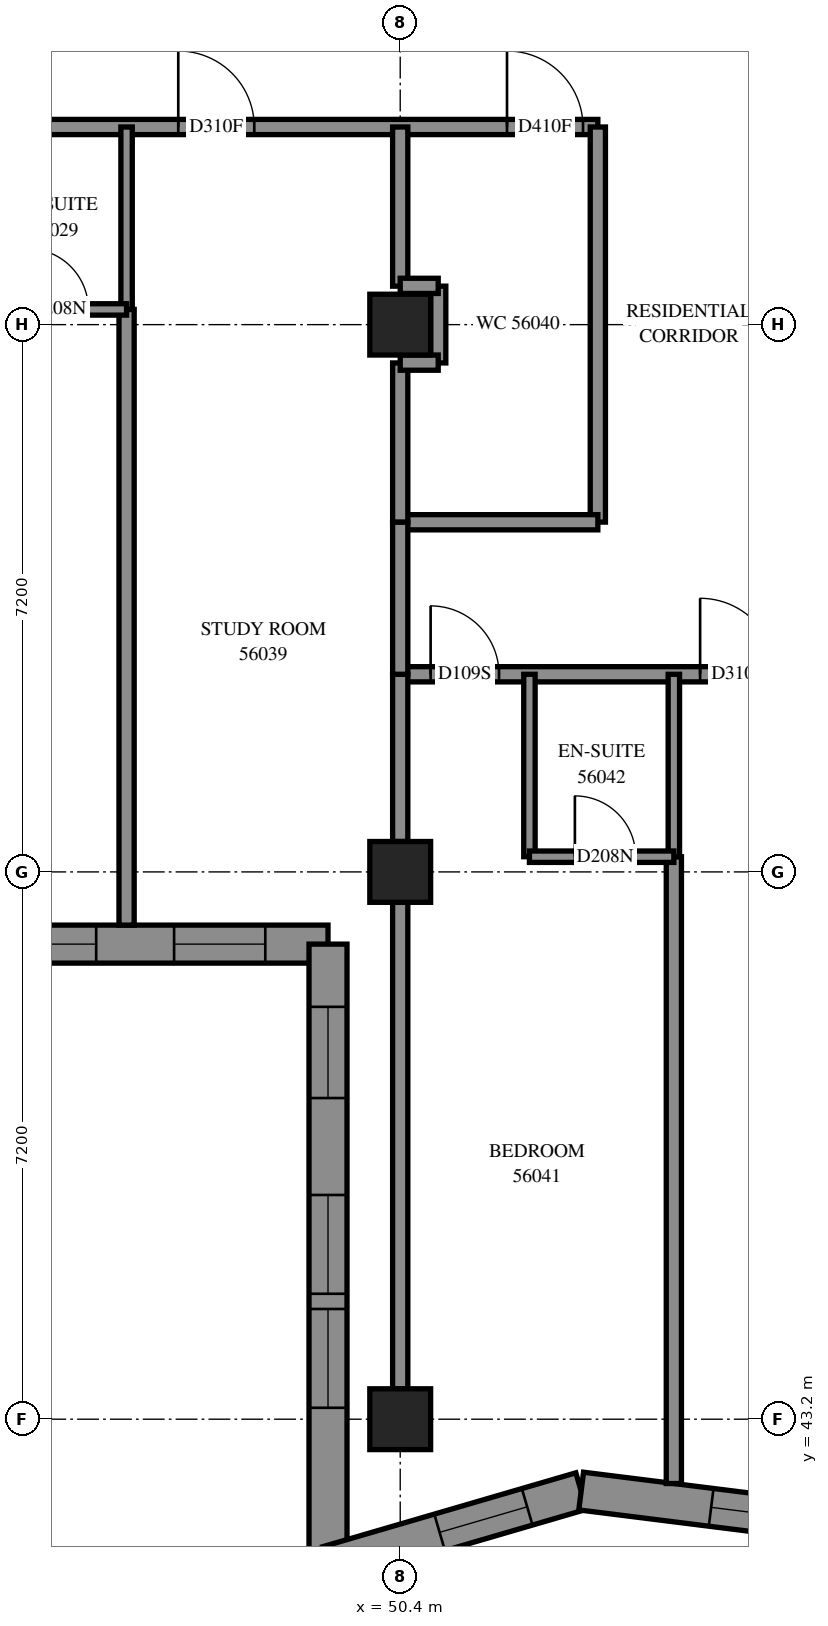
"""IFC4 building model, lengths in metres.
Left out: names, types, materials, properties, quantities, classifications, styles, units other than length and angle.
Written with IfcOpenShell. Run it as: python <this file> out.ifc"""

import sys

from ifc_helpers import new_model, si_unit, direction, frame, frame_2d, origin, origin_2d, place, context, subcontext, project, spatial, polyline, rectangle, outline, extrude, element, fill, save


model = new_model("IFC4")
c1 = context("Model", 3, precision=1e-05, world=origin(), true_north=direction((0.0, 1.0)))
c2 = subcontext(c1, "Body", "Model", "MODEL_VIEW")
j1 = project(units=[si_unit("LENGTHUNIT", "METRE"), si_unit("PLANEANGLEUNIT", "RADIAN")], contexts=[c1])
p1 = place(None, origin())
s1 = spatial("IfcSite", under=j1, at=p1, CompositionType="ELEMENT")
p2 = place(p1, origin())
s2 = spatial("IfcBuilding", under=s1, at=p2, CompositionType="ELEMENT")
p3 = place(p2, frame((0.0, 0.0, 206.6)))
s3 = spatial("IfcBuildingStorey", under=s2, at=p3, CompositionType="ELEMENT", Elevation=206.6)
for number, where, z_axis, x_axis in (
    (1, (50.4, 43.2, 0.0), (0.0, 0.0, 1.0), (1.0, 0.0, 0.0)),
    (2, (50.4, 50.4, 0.0), (0.0, 0.0, 1.0), (1.0, 0.0, 0.0)),
    (3, (50.4, 57.6, 0.0), (0.0, 0.0, 1.0), (1.0, 0.0, 0.0)),
):
    element("IfcColumn", number, at=place(p3, frame(where, z_axis=z_axis, x_axis=x_axis)), inside=s3, PredefinedType="COLUMN", context=c2, shape_type="SweptSolid", body=[
        extrude(rectangle(XDim=0.8, YDim=0.8, at=origin_2d()), origin(), (0.0, 0.0, 1.0), 3.1),
    ])
p4 = place(p3, frame((42.25, 49.45, 0.0), z_axis=(0.0, 0.0, 1.0), x_axis=(1.0, 0.0, 0.0)))
e4 = element("IfcWall", 4, at=p4, inside=s3, PredefinedType="SOLIDWALL", context=c2, shape_type="SweptSolid", body=[
    extrude(outline(polyline([(-0.25, -0.25), (6.95, -0.25), (7.45, 0.25), (0.25, 0.25), (-0.25, -0.25)])), origin(), (0.0, 0.0, 1.0), 3.1),
])
p5 = place(p4, frame((1.35, 0.0, 0.45)))
e5 = element("IfcOpeningElement", 5, at=p5, cuts=e4, PredefinedType="OPENING", context=c2, shape_type="SweptSolid", body=[
    extrude(rectangle(XDim=1.3, YDim=2.5, at=frame_2d((0.65, 1.25))), frame((0.0, 0.26, 0.0), z_axis=(0.0, -1.0, 0.0), x_axis=(1.0, 0.0, 0.0)), (0.0, 0.0, 1.0), 0.52),
])
p6 = place(p4, frame((2.85, 0.0, 0.45)))
e6 = element("IfcOpeningElement", 6, at=p6, cuts=e4, PredefinedType="OPENING", context=c2, shape_type="SweptSolid", body=[
    extrude(rectangle(XDim=1.3, YDim=2.5, at=frame_2d((0.65, 1.25))), frame((0.0, 0.26, 0.0), z_axis=(0.0, -1.0, 0.0), x_axis=(1.0, 0.0, 0.0)), (0.0, 0.0, 1.0), 0.52),
])
p7 = place(p4, frame((5.175, 0.0, 0.45)))
e7 = element("IfcOpeningElement", 7, at=p7, cuts=e4, PredefinedType="OPENING", context=c2, shape_type="SweptSolid", body=[
    extrude(rectangle(XDim=1.2, YDim=2.5, at=frame_2d((0.6, 1.25))), frame((0.0, 0.26, 0.0), z_axis=(0.0, -1.0, 0.0), x_axis=(1.0, 0.0, 0.0)), (0.0, 0.0, 1.0), 0.52),
])
p8 = place(p3, frame((49.45, 49.45, 0.0), z_axis=(0.0, 0.0, 1.0), x_axis=(0.0, -1.0, 0.0)))
e8 = element("IfcWall", 8, at=p8, inside=s3, PredefinedType="SOLIDWALL", context=c2, shape_type="SweptSolid", body=[
    extrude(outline(polyline([(0.25, -0.25), (8.501, -0.25), (7.834, 0.25), (-0.25, 0.25), (0.25, -0.25)])), origin(), (0.0, 0.0, 1.0), 3.1),
])
p9 = place(p8, frame((3.3, 0.0, 0.45)))
e9 = element("IfcOpeningElement", 9, at=p9, cuts=e8, PredefinedType="OPENING", context=c2, shape_type="SweptSolid", body=[
    extrude(rectangle(XDim=1.3, YDim=2.5, at=frame_2d((0.65, 1.25))), frame((0.0, 0.26, 0.0), z_axis=(0.0, -1.0, 0.0), x_axis=(1.0, 0.0, 0.0)), (0.0, 0.0, 1.0), 0.52),
])
p10 = place(p8, frame((4.8, 0.0, 0.45)))
e10 = element("IfcOpeningElement", 10, at=p10, cuts=e8, PredefinedType="OPENING", context=c2, shape_type="SweptSolid", body=[
    extrude(rectangle(XDim=1.3, YDim=2.5, at=frame_2d((0.65, 1.25))), frame((0.0, 0.26, 0.0), z_axis=(0.0, -1.0, 0.0), x_axis=(1.0, 0.0, 0.0)), (0.0, 0.0, 1.0), 0.52),
])
p11 = place(p8, frame((0.825, 0.0, 0.45)))
e11 = element("IfcOpeningElement", 11, at=p11, cuts=e8, PredefinedType="OPENING", context=c2, shape_type="SweptSolid", body=[
    extrude(rectangle(XDim=1.2, YDim=2.5, at=frame_2d((0.6, 1.25))), frame((0.0, 0.26, 0.0), z_axis=(0.0, -1.0, 0.0), x_axis=(1.0, 0.0, 0.0)), (0.0, 0.0, 1.0), 0.52),
])
p12 = place(p3, frame((49.45, 41.282, 0.0), z_axis=(0.0, 0.0, 1.0), x_axis=(0.9599454259, 0.2801870435, 0.0)))
e12 = element("IfcWall", 12, at=p12, inside=s3, PredefinedType="SOLIDWALL", context=c2, shape_type="SweptSolid", body=[
    extrude(outline(polyline([(-0.333, -0.25), (3.418, -0.25), (3.521, 0.25), (0.333, 0.25), (-0.333, -0.25)])), origin(), (0.0, 0.0, 1.0), 3.1),
])
p13 = place(p12, frame((1.53, 0.0, 0.45)))
e13 = element("IfcOpeningElement", 13, at=p13, cuts=e12, PredefinedType="OPENING", context=c2, shape_type="SweptSolid", body=[
    extrude(rectangle(XDim=1.2, YDim=2.5, at=frame_2d((0.6, 1.25))), frame((0.0, 0.26, 0.0), z_axis=(0.0, -1.0, 0.0), x_axis=(1.0, 0.0, 0.0)), (0.0, 0.0, 1.0), 0.52),
])
p14 = place(p3, frame((52.781, 42.255, 0.0), z_axis=(0.0, 0.0, 1.0), x_axis=(0.9922491844, -0.1242640575, 0.0)))
e14 = element("IfcWall", 14, at=p14, inside=s3, PredefinedType="SOLIDWALL", context=c2, shape_type="SweptSolid", body=[
    extrude(outline(polyline([(0.052, -0.25), (3.681, -0.25), (3.618, 0.25), (-0.052, 0.25), (0.052, -0.25)])), origin(), (0.0, 0.0, 1.0), 3.1),
])
p15 = place(p14, frame((1.724, 0.0, 0.45)))
e15 = element("IfcOpeningElement", 15, at=p15, cuts=e14, PredefinedType="OPENING", context=c2, shape_type="SweptSolid", body=[
    extrude(rectangle(XDim=1.2, YDim=2.5, at=frame_2d((0.6, 1.25))), frame((0.0, 0.26, 0.0), z_axis=(0.0, -1.0, 0.0), x_axis=(1.0, 0.0, 0.0)), (0.0, 0.0, 1.0), 0.52),
])
p16 = place(p3, frame((36.0, 60.2, 0.0), z_axis=(0.0, 0.0, 1.0), x_axis=(1.0, 0.0, 0.0)))
e16 = element("IfcWall", 16, at=p16, inside=s3, PredefinedType="PARTITIONING", context=c2, shape_type="SweptSolid", body=[
    extrude(rectangle(XDim=17.0, YDim=0.2, at=frame_2d((8.5, 0.0))), origin(), (0.0, 0.0, 1.0), 3.1),
])
p17 = place(p16, frame((4.125, 0.0, 0.0)))
e17 = element("IfcOpeningElement", 17, at=p17, cuts=e16, PredefinedType="OPENING", context=c2, shape_type="SweptSolid", body=[
    extrude(rectangle(XDim=1.0, YDim=2.1, at=frame_2d((0.5, 1.05))), frame((0.0, 0.11, 0.0), z_axis=(0.0, -1.0, 0.0), x_axis=(1.0, 0.0, 0.0)), (0.0, 0.0, 1.0), 0.22),
])
p18 = place(p16, frame((7.6, 0.0, 0.0)))
e18 = element("IfcOpeningElement", 18, at=p18, cuts=e16, PredefinedType="OPENING", context=c2, shape_type="SweptSolid", body=[
    extrude(rectangle(XDim=0.9, YDim=2.1, at=frame_2d((0.45, 1.05))), frame((0.0, 0.11, 0.0), z_axis=(0.0, -1.0, 0.0), x_axis=(1.0, 0.0, 0.0)), (0.0, 0.0, 1.0), 0.22),
])
p19 = place(p16, frame((11.48, 0.0, 0.0)))
e19 = element("IfcOpeningElement", 19, at=p19, cuts=e16, PredefinedType="OPENING", context=c2, shape_type="SweptSolid", body=[
    extrude(rectangle(XDim=1.0, YDim=2.1, at=frame_2d((0.5, 1.05))), frame((0.0, 0.11, 0.0), z_axis=(0.0, -1.0, 0.0), x_axis=(1.0, 0.0, 0.0)), (0.0, 0.0, 1.0), 0.22),
])
p20 = place(p16, frame((15.805, 0.0, 0.0)))
e20 = element("IfcOpeningElement", 20, at=p20, cuts=e16, PredefinedType="OPENING", context=c2, shape_type="SweptSolid", body=[
    extrude(rectangle(XDim=1.0, YDim=2.1, at=frame_2d((0.5, 1.05))), frame((0.0, 0.11, 0.0), z_axis=(0.0, -1.0, 0.0), x_axis=(1.0, 0.0, 0.0)), (0.0, 0.0, 1.0), 0.22),
])
p21 = place(p3, frame((54.0, 42.354, 0.0), z_axis=(0.0, 0.0, 1.0), x_axis=(0.0, 1.0, 0.0)))
e21 = element("IfcWall", 21, at=p21, inside=s3, PredefinedType="PARTITIONING", context=c2, shape_type="SweptSolid", body=[
    extrude(rectangle(XDim=8.246, YDim=0.2, at=frame_2d((4.123, 0.0))), origin(), (0.0, 0.0, 1.0), 3.1),
])
p22 = place(p3, frame((46.8, 49.7, 0.0), z_axis=(0.0, 0.0, 1.0), x_axis=(0.0, 1.0, 0.0)))
e22 = element("IfcWall", 22, at=p22, inside=s3, PredefinedType="PARTITIONING", context=c2, shape_type="SweptSolid", body=[
    extrude(rectangle(XDim=8.1, YDim=0.2, at=frame_2d((4.05, 0.0))), origin(), (0.0, 0.0, 1.0), 3.1),
])
p23 = place(p3, frame((50.4, 43.6, 0.0), z_axis=(0.0, 0.0, 1.0), x_axis=(0.0, 1.0, 0.0)))
e23 = element("IfcWall", 23, at=p23, inside=s3, PredefinedType="PARTITIONING", context=c2, shape_type="SweptSolid", body=[
    extrude(rectangle(XDim=6.4, YDim=0.2, at=frame_2d((3.2, 0.0))), origin(), (0.0, 0.0, 1.0), 2.6),
])
p24 = place(p3, frame((50.4, 53.0, 0.0), z_axis=(0.0, 0.0, 1.0), x_axis=(1.0, 0.0, 0.0)))
e24 = element("IfcWall", 24, at=p24, inside=s3, PredefinedType="PARTITIONING", context=c2, shape_type="SweptSolid", body=[
    extrude(rectangle(XDim=5.2, YDim=0.2, at=frame_2d((2.6, 0.0))), origin(), (0.0, 0.0, 1.0), 3.1),
])
p25 = place(p24, frame((0.4, 0.0, 0.0)))
e25 = element("IfcOpeningElement", 25, at=p25, cuts=e24, PredefinedType="OPENING", context=c2, shape_type="SweptSolid", body=[
    extrude(rectangle(XDim=0.9, YDim=2.1, at=frame_2d((0.45, 1.05))), frame((0.0, 0.11, 0.0), z_axis=(0.0, -1.0, 0.0), x_axis=(1.0, 0.0, 0.0)), (0.0, 0.0, 1.0), 0.22),
])
p26 = place(p24, frame((3.946, 0.0, 0.0)))
e26 = element("IfcOpeningElement", 26, at=p26, cuts=e24, PredefinedType="OPENING", context=c2, shape_type="SweptSolid", body=[
    extrude(rectangle(XDim=1.0, YDim=2.1, at=frame_2d((0.5, 1.05))), frame((0.0, 0.11, 0.0), z_axis=(0.0, -1.0, 0.0), x_axis=(1.0, 0.0, 0.0)), (0.0, 0.0, 1.0), 0.22),
])
p27 = place(p3, frame((53.0, 55.002, 0.0), z_axis=(0.0, 0.0, 1.0), x_axis=(0.0, 1.0, 0.0)))
e27 = element("IfcWall", 27, at=p27, inside=s3, PredefinedType="PARTITIONING", context=c2, shape_type="SweptSolid", body=[
    extrude(rectangle(XDim=5.198, YDim=0.2, at=frame_2d((2.599, 0.0))), origin(), (0.0, 0.0, 1.0), 3.1),
])
p28 = place(p3, frame((50.4, 55.0, 0.0), z_axis=(0.0, 0.0, 1.0), x_axis=(1.0, 0.0, 0.0)))
e28 = element("IfcWall", 28, at=p28, inside=s3, PredefinedType="PARTITIONING", context=c2, shape_type="SweptSolid", body=[
    extrude(rectangle(XDim=2.6, YDim=0.2, at=frame_2d((1.3, 0.0))), origin(), (0.0, 0.0, 1.0), 3.1),
])
for number, where, z_axis, x_axis in (
    (29, (46.8, 57.8, 0.0), (0.0, 0.0, 1.0), (0.0, 1.0, 0.0)),
    (30, (52.1, 50.6, 0.0), (0.0, 0.0, 1.0), (0.0, 1.0, 0.0)),
    (31, (54.0, 50.6, 0.0), (0.0, 0.0, 1.0), (0.0, 1.0, 0.0)),
):
    element("IfcWall", number, at=place(p3, frame(where, z_axis=z_axis, x_axis=x_axis)), inside=s3, PredefinedType="PARTITIONING", context=c2, shape_type="SweptSolid", body=[
        extrude(rectangle(XDim=2.4, YDim=0.15, at=frame_2d((1.2, 0.0))), origin(), (0.0, 0.0, 1.0), 3.1),
    ])
p29 = place(p3, frame((50.4, 50.8, 0.0), z_axis=(0.0, 0.0, 1.0), x_axis=(0.0, 1.0, 0.0)))
e32 = element("IfcWall", 32, at=p29, inside=s3, PredefinedType="PARTITIONING", context=c2, shape_type="SweptSolid", body=[
    extrude(rectangle(XDim=2.2, YDim=0.2, at=frame_2d((1.1, 0.0))), origin(), (0.0, 0.0, 1.0), 3.1),
])
p30 = place(p3, frame((50.4, 55.0, 0.0), z_axis=(0.0, 0.0, 1.0), x_axis=(0.0, 1.0, 0.0)))
e33 = element("IfcWall", 33, at=p30, inside=s3, PredefinedType="PARTITIONING", context=c2, shape_type="SweptSolid", body=[
    extrude(rectangle(XDim=2.096, YDim=0.2, at=frame_2d((1.048, 0.0))), origin(), (0.0, 0.0, 1.0), 3.1),
])
p31 = place(p3, frame((50.4, 58.106, 0.0), z_axis=(0.0, 0.0, 1.0), x_axis=(0.0, 1.0, 0.0)))
e34 = element("IfcWall", 34, at=p31, inside=s3, PredefinedType="PARTITIONING", context=c2, shape_type="SweptSolid", body=[
    extrude(rectangle(XDim=2.094, YDim=0.2, at=frame_2d((1.047, 0.0))), origin(), (0.0, 0.0, 1.0), 3.1),
])
p32 = place(p3, frame((50.4, 53.0, 0.0), z_axis=(0.0, 0.0, 1.0), x_axis=(0.0, 1.0, 0.0)))
e35 = element("IfcWall", 35, at=p32, inside=s3, PredefinedType="PARTITIONING", context=c2, shape_type="SweptSolid", body=[
    extrude(rectangle(XDim=2.0, YDim=0.2, at=frame_2d((1.0, 0.0))), origin(), (0.0, 0.0, 1.0), 3.1),
])
p33 = place(p3, frame((44.9, 57.8, 0.0), z_axis=(0.0, 0.0, 1.0), x_axis=(1.0, 0.0, 0.0)))
e36 = element("IfcWall", 36, at=p33, inside=s3, PredefinedType="PARTITIONING", context=c2, shape_type="SweptSolid", body=[
    extrude(rectangle(XDim=1.9, YDim=0.15, at=frame_2d((0.95, 0.0))), origin(), (0.0, 0.0, 1.0), 3.1),
])
p34 = place(p33, frame((0.598, 0.0, 0.0)))
e37 = element("IfcOpeningElement", 37, at=p34, cuts=e36, PredefinedType="OPENING", context=c2, shape_type="SweptSolid", body=[
    extrude(rectangle(XDim=0.8, YDim=2.1, at=frame_2d((0.4, 1.05))), frame((0.0, 0.085, 0.0), z_axis=(0.0, -1.0, 0.0), x_axis=(1.0, 0.0, 0.0)), (0.0, 0.0, 1.0), 0.17),
])
p35 = place(p3, frame((52.1, 50.6, 0.0), z_axis=(0.0, 0.0, 1.0), x_axis=(1.0, 0.0, 0.0)))
e38 = element("IfcWall", 38, at=p35, inside=s3, PredefinedType="PARTITIONING", context=c2, shape_type="SweptSolid", body=[
    extrude(rectangle(XDim=1.9, YDim=0.15, at=frame_2d((0.95, 0.0))), origin(), (0.0, 0.0, 1.0), 3.1),
])
p36 = place(p35, frame((0.598, 0.0, 0.0)))
e39 = element("IfcOpeningElement", 39, at=p36, cuts=e38, PredefinedType="OPENING", context=c2, shape_type="SweptSolid", body=[
    extrude(rectangle(XDim=0.8, YDim=2.1, at=frame_2d((0.4, 1.05))), frame((0.0, 0.085, 0.0), z_axis=(0.0, -1.0, 0.0), x_axis=(1.0, 0.0, 0.0)), (0.0, 0.0, 1.0), 0.17),
])
p37 = place(p3, frame((50.9, 57.096, 0.0), z_axis=(0.0, 0.0, 1.0), x_axis=(0.0, 1.0, 0.0)))
e40 = element("IfcWall", 40, at=p37, inside=s3, PredefinedType="PARTITIONING", context=c2, shape_type="SweptSolid", body=[
    extrude(rectangle(XDim=1.01, YDim=0.2, at=frame_2d((0.505, 0.0))), origin(), (0.0, 0.0, 1.0), 3.1),
])
for number, where, z_axis, x_axis in (
    (41, (50.4, 58.11, 0.0), (0.0, 0.0, 1.0), (1.0, 0.0, 0.0)),
    (42, (50.4, 57.1, 0.0), (0.0, 0.0, 1.0), (1.0, 0.0, 0.0)),
):
    element("IfcWall", number, at=place(p3, frame(where, z_axis=z_axis, x_axis=x_axis)), inside=s3, PredefinedType="PARTITIONING", context=c2, shape_type="SweptSolid", body=[
        extrude(rectangle(XDim=0.5, YDim=0.2, at=frame_2d((0.25, 0.0))), origin(), (0.0, 0.0, 1.0), 3.1),
    ])
p38 = place(p6, origin())
e43 = element("IfcWindow", 43, at=p38, inside=s3, PartitioningType="SINGLE_PANEL", PredefinedType="WINDOW", context=c2, shape_type="SweptSolid", body=[
    extrude(rectangle(XDim=1.3, YDim=2.5, at=frame_2d((0.65, 1.25))), frame((0.0, 0.18, 0.0), z_axis=(0.0, -1.0, 0.0), x_axis=(1.0, 0.0, 0.0)), (0.0, 0.0, 1.0), 0.06),
])
fill(e6, e43)
p39 = place(p7, origin())
e44 = element("IfcWindow", 44, at=p39, inside=s3, PartitioningType="SINGLE_PANEL", PredefinedType="WINDOW", context=c2, shape_type="SweptSolid", body=[
    extrude(rectangle(XDim=1.2, YDim=2.5, at=frame_2d((0.6, 1.25))), frame((0.0, 0.18, 0.0), z_axis=(0.0, -1.0, 0.0), x_axis=(1.0, 0.0, 0.0)), (0.0, 0.0, 1.0), 0.06),
])
fill(e7, e44)
p40 = place(p9, origin())
e45 = element("IfcWindow", 45, at=p40, inside=s3, PartitioningType="SINGLE_PANEL", PredefinedType="WINDOW", context=c2, shape_type="SweptSolid", body=[
    extrude(rectangle(XDim=1.3, YDim=2.5, at=frame_2d((0.65, 1.25))), frame((0.0, 0.18, 0.0), z_axis=(0.0, -1.0, 0.0), x_axis=(1.0, 0.0, 0.0)), (0.0, 0.0, 1.0), 0.06),
])
fill(e9, e45)
p41 = place(p10, origin())
e46 = element("IfcWindow", 46, at=p41, inside=s3, PartitioningType="SINGLE_PANEL", PredefinedType="WINDOW", context=c2, shape_type="SweptSolid", body=[
    extrude(rectangle(XDim=1.3, YDim=2.5, at=frame_2d((0.65, 1.25))), frame((0.0, 0.18, 0.0), z_axis=(0.0, -1.0, 0.0), x_axis=(1.0, 0.0, 0.0)), (0.0, 0.0, 1.0), 0.06),
])
fill(e10, e46)
p42 = place(p11, origin())
e47 = element("IfcWindow", 47, at=p42, inside=s3, PartitioningType="SINGLE_PANEL", PredefinedType="WINDOW", context=c2, shape_type="SweptSolid", body=[
    extrude(rectangle(XDim=1.2, YDim=2.5, at=frame_2d((0.6, 1.25))), frame((0.0, 0.18, 0.0), z_axis=(0.0, -1.0, 0.0), x_axis=(1.0, 0.0, 0.0)), (0.0, 0.0, 1.0), 0.06),
])
fill(e11, e47)
p43 = place(p13, origin())
e48 = element("IfcWindow", 48, at=p43, inside=s3, PartitioningType="SINGLE_PANEL", PredefinedType="WINDOW", context=c2, shape_type="SweptSolid", body=[
    extrude(rectangle(XDim=1.2, YDim=2.5, at=frame_2d((0.6, 1.25))), frame((0.0, 0.18, 0.0), z_axis=(0.0, -1.0, 0.0), x_axis=(1.0, 0.0, 0.0)), (0.0, 0.0, 1.0), 0.06),
])
fill(e13, e48)
p44 = place(p15, origin())
e49 = element("IfcWindow", 49, at=p44, inside=s3, PartitioningType="SINGLE_PANEL", PredefinedType="WINDOW", context=c2, shape_type="SweptSolid", body=[
    extrude(rectangle(XDim=1.2, YDim=2.5, at=frame_2d((0.6, 1.25))), frame((0.0, 0.18, 0.0), z_axis=(0.0, -1.0, 0.0), x_axis=(1.0, 0.0, 0.0)), (0.0, 0.0, 1.0), 0.06),
])
fill(e15, e49)
p45 = place(p34, origin())
e50 = element("IfcDoor", 50, at=p45, inside=s3, OperationType="SINGLE_SWING_RIGHT", PredefinedType="DOOR", context=c2, shape_type="SweptSolid", body=[
    extrude(rectangle(XDim=0.8, YDim=2.1, at=frame_2d((0.4, 1.05))), frame((0.0, 0.025, 0.0), z_axis=(0.0, -1.0, 0.0), x_axis=(1.0, 0.0, 0.0)), (0.0, 0.0, 1.0), 0.05),
])
fill(e37, e50)
p46 = place(p19, origin())
e51 = element("IfcDoor", 51, at=p46, inside=s3, OperationType="SINGLE_SWING_RIGHT", PredefinedType="DOOR", context=c2, shape_type="SweptSolid", body=[
    extrude(rectangle(XDim=1.0, YDim=2.1, at=frame_2d((0.5, 1.05))), frame((0.0, 0.025, 0.0), z_axis=(0.0, -1.0, 0.0), x_axis=(1.0, 0.0, 0.0)), (0.0, 0.0, 1.0), 0.05),
])
fill(e19, e51)
p47 = place(p20, origin())
e52 = element("IfcDoor", 52, at=p47, inside=s3, OperationType="SINGLE_SWING_LEFT", PredefinedType="DOOR", context=c2, shape_type="SweptSolid", body=[
    extrude(rectangle(XDim=1.0, YDim=2.1, at=frame_2d((0.5, 1.05))), frame((0.0, 0.025, 0.0), z_axis=(0.0, -1.0, 0.0), x_axis=(1.0, 0.0, 0.0)), (0.0, 0.0, 1.0), 0.05),
])
fill(e20, e52)
p48 = place(p25, origin())
e53 = element("IfcDoor", 53, at=p48, inside=s3, OperationType="SINGLE_SWING_LEFT", PredefinedType="DOOR", context=c2, shape_type="SweptSolid", body=[
    extrude(rectangle(XDim=0.9, YDim=2.1, at=frame_2d((0.45, 1.05))), frame((0.0, 0.025, 0.0), z_axis=(0.0, -1.0, 0.0), x_axis=(1.0, 0.0, 0.0)), (0.0, 0.0, 1.0), 0.05),
])
fill(e25, e53)
p49 = place(p36, origin())
e54 = element("IfcDoor", 54, at=p49, inside=s3, OperationType="SINGLE_SWING_RIGHT", PredefinedType="DOOR", context=c2, shape_type="SweptSolid", body=[
    extrude(rectangle(XDim=0.8, YDim=2.1, at=frame_2d((0.4, 1.05))), frame((0.0, 0.025, 0.0), z_axis=(0.0, -1.0, 0.0), x_axis=(1.0, 0.0, 0.0)), (0.0, 0.0, 1.0), 0.05),
])
fill(e39, e54)
p50 = place(p26, origin())
e55 = element("IfcDoor", 55, at=p50, inside=s3, OperationType="SINGLE_SWING_RIGHT", PredefinedType="DOOR", context=c2, shape_type="SweptSolid", body=[
    extrude(rectangle(XDim=1.0, YDim=2.1, at=frame_2d((0.5, 1.05))), frame((0.0, 0.025, 0.0), z_axis=(0.0, -1.0, 0.0), x_axis=(1.0, 0.0, 0.0)), (0.0, 0.0, 1.0), 0.05),
])
fill(e26, e55)
save(model, sys.argv[1])
